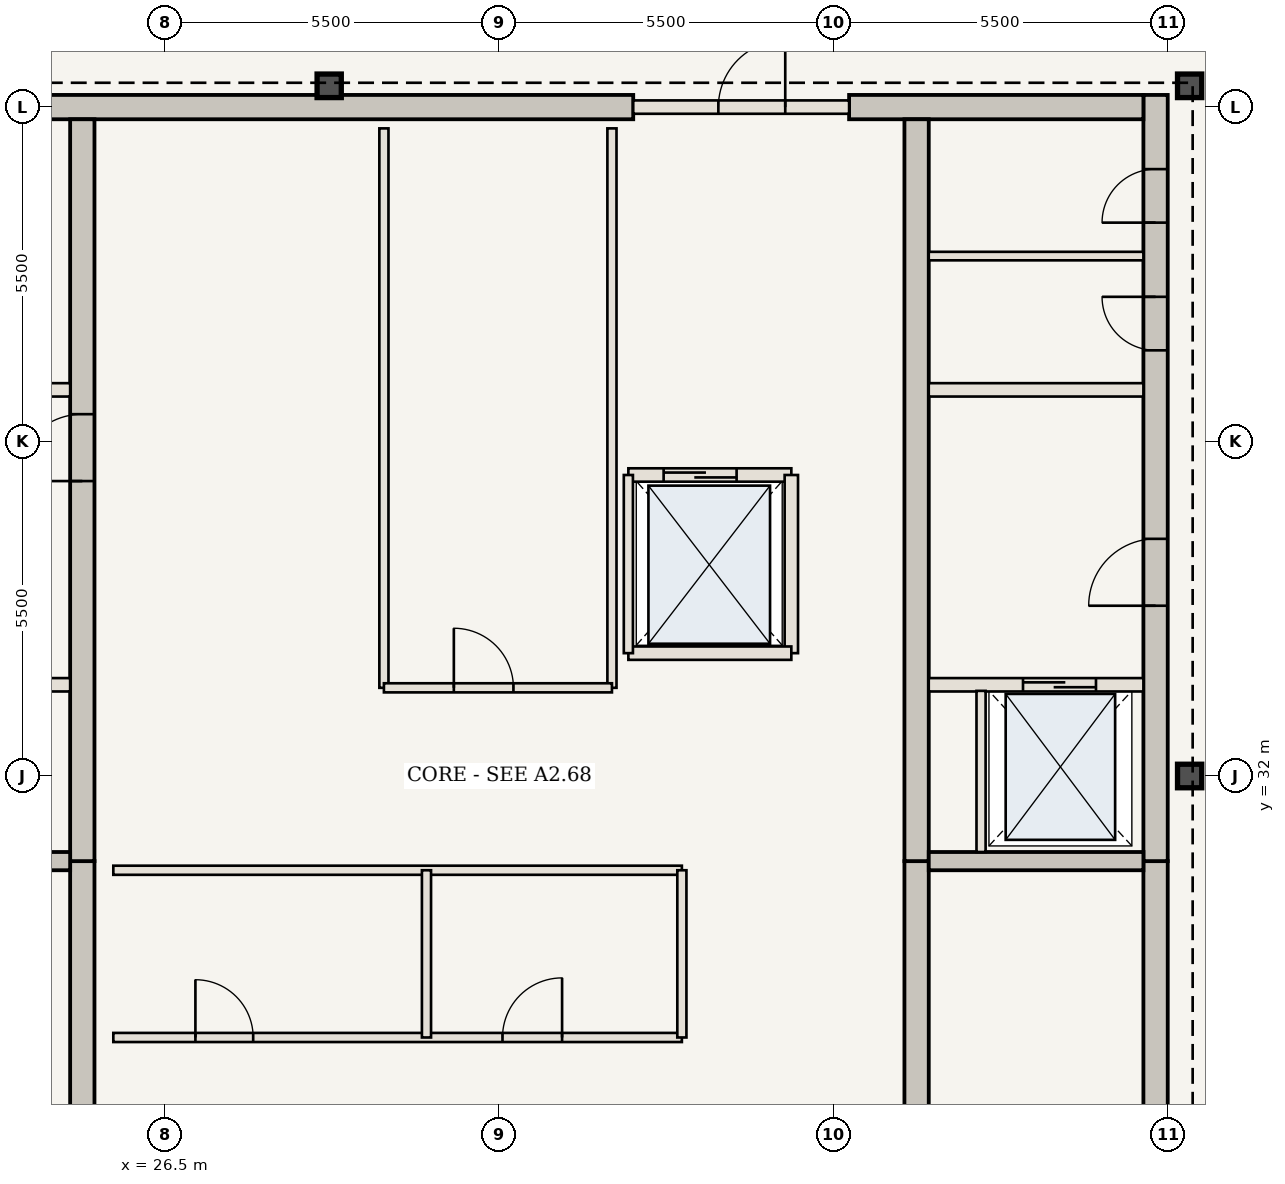
"""IFC4 building model, lengths in metres.
Left out: names, types, materials, properties, quantities, classifications, styles, units other than length and angle.
Written with IfcOpenShell. Run it as: python <this file> out.ifc"""

import sys

from ifc_helpers import new_model, si_unit, direction, frame, frame_2d, origin, origin_2d, place, context, subcontext, project, spatial, rectangle, i_section, extrude, element, fill, save


model = new_model("IFC4")
c1 = context("Model", 3, precision=1e-05, world=origin(), true_north=direction((0.0, 1.0)))
c2 = subcontext(c1, "Body", "Model", "MODEL_VIEW")
j1 = project(units=[si_unit("LENGTHUNIT", "METRE"), si_unit("PLANEANGLEUNIT", "RADIAN")], contexts=[c1])
p1 = place(None, origin())
s1 = spatial("IfcSite", under=j1, at=p1, CompositionType="ELEMENT")
p2 = place(p1, origin())
s2 = spatial("IfcBuilding", under=s1, at=p2, CompositionType="ELEMENT")
p3 = place(p2, frame((0.0, 0.0, 326.9)))
s3 = spatial("IfcBuildingStorey", under=s2, at=p3, CompositionType="ELEMENT", Elevation=326.9)
p4 = place(p3, frame((42.79, 20.75, 0.0), z_axis=(0.0, 0.0, 1.0), x_axis=(0.0, 1.0, 0.0)))
e1 = element("IfcWall", 1, at=p4, inside=s3, PredefinedType="SHEAR", context=c2, shape_type="SweptSolid", body=[
    extrude(rectangle(XDim=9.85, YDim=0.4, at=frame_2d((4.925, 0.0))), origin(), (0.0, 0.0, 1.0), 4.55),
])
p5 = place(p4, frame((1.0, 0.0, 0.0)))
e2 = element("IfcOpeningElement", 2, at=p5, cuts=e1, PredefinedType="OPENING", context=c2, shape_type="SweptSolid", body=[
    extrude(rectangle(XDim=1.15, YDim=2.15, at=frame_2d((0.575, 1.075))), frame((0.0, 0.21, 0.0), z_axis=(0.0, -1.0, 0.0), x_axis=(1.0, 0.0, 0.0)), (0.0, 0.0, 1.0), 0.42),
])
p6 = place(p3, frame((42.79, 30.6, 0.0), z_axis=(0.0, 0.0, 1.0), x_axis=(0.0, 1.0, 0.0)))
e3 = element("IfcWall", 3, at=p6, inside=s3, PredefinedType="SHEAR", context=c2, shape_type="SweptSolid", body=[
    extrude(rectangle(XDim=12.6, YDim=0.4, at=frame_2d((6.3, 0.0))), origin(), (0.0, 0.0, 1.0), 4.55),
])
p7 = place(p6, frame((4.2, 0.0, 0.0)))
e4 = element("IfcOpeningElement", 4, at=p7, cuts=e3, PredefinedType="OPENING", context=c2, shape_type="SweptSolid", body=[
    extrude(rectangle(XDim=1.1, YDim=2.15, at=frame_2d((0.55, 1.075))), frame((0.0, 0.21, 0.0), z_axis=(0.0, -1.0, 0.0), x_axis=(1.0, 0.0, 0.0)), (0.0, 0.0, 1.0), 0.42),
])
p8 = place(p6, frame((8.4, 0.0, 0.0)))
e5 = element("IfcOpeningElement", 5, at=p8, cuts=e3, PredefinedType="OPENING", context=c2, shape_type="SweptSolid", body=[
    extrude(rectangle(XDim=0.88, YDim=2.1, at=frame_2d((0.44, 1.05))), frame((0.0, 0.21, 0.0), z_axis=(0.0, -1.0, 0.0), x_axis=(1.0, 0.0, 0.0)), (0.0, 0.0, 1.0), 0.42),
])
p9 = place(p6, frame((10.5, 0.0, 0.0)))
e6 = element("IfcOpeningElement", 6, at=p9, cuts=e3, PredefinedType="OPENING", context=c2, shape_type="SweptSolid", body=[
    extrude(rectangle(XDim=0.88, YDim=2.1, at=frame_2d((0.44, 1.05))), frame((0.0, 0.21, 0.0), z_axis=(0.0, -1.0, 0.0), x_axis=(1.0, 0.0, 0.0)), (0.0, 0.0, 1.0), 0.42),
])
p10 = place(p3, frame((21.41, 43.0, 0.0), z_axis=(0.0, 0.0, 1.0), x_axis=(1.0, 0.0, 0.0)))
e7 = element("IfcWall", 7, at=p10, inside=s3, PredefinedType="SHEAR", context=c2, shape_type="SweptSolid", body=[
    extrude(rectangle(XDim=12.79, YDim=0.4, at=frame_2d((6.395, 0.0))), origin(), (0.0, 0.0, 1.0), 4.55),
])
p11 = place(p3, frame((37.75, 43.0, 0.0), z_axis=(0.0, 0.0, 1.0), x_axis=(1.0, 0.0, 0.0)))
e8 = element("IfcWall", 8, at=p11, inside=s3, PredefinedType="SHEAR", context=c2, shape_type="SweptSolid", body=[
    extrude(rectangle(XDim=4.84, YDim=0.4, at=frame_2d((2.42, 0.0))), origin(), (0.0, 0.0, 1.0), 4.55),
])
p12 = place(p3, frame((25.14, 21.15, 0.0), z_axis=(0.0, 0.0, 1.0), x_axis=(0.0, 1.0, 0.0)))
e9 = element("IfcWall", 9, at=p12, inside=s3, PredefinedType="SHEAR", context=c2, shape_type="SweptSolid", body=[
    extrude(rectangle(XDim=9.45, YDim=0.4, at=frame_2d((4.725, 0.0))), origin(), (0.0, 0.0, 1.0), 4.55),
])
p13 = place(p3, frame((25.14, 30.6, 0.0), z_axis=(0.0, 0.0, 1.0), x_axis=(0.0, 1.0, 0.0)))
e10 = element("IfcWall", 10, at=p13, inside=s3, PredefinedType="SHEAR", context=c2, shape_type="SweptSolid", body=[
    extrude(rectangle(XDim=12.2, YDim=0.4, at=frame_2d((6.1, 0.0))), origin(), (0.0, 0.0, 1.0), 4.55),
])
p14 = place(p13, frame((6.25, 0.0, 0.0)))
e11 = element("IfcOpeningElement", 11, at=p14, cuts=e10, PredefinedType="OPENING", context=c2, shape_type="SweptSolid", body=[
    extrude(rectangle(XDim=1.1, YDim=2.15, at=frame_2d((0.55, 1.075))), frame((0.0, 0.21, 0.0), z_axis=(0.0, -1.0, 0.0), x_axis=(1.0, 0.0, 0.0)), (0.0, 0.0, 1.0), 0.42),
])
p15 = place(p3, frame((38.86, 21.15, 0.0), z_axis=(0.0, 0.0, 1.0), x_axis=(0.0, 1.0, 0.0)))
e12 = element("IfcWall", 12, at=p15, inside=s3, PredefinedType="SHEAR", context=c2, shape_type="SweptSolid", body=[
    extrude(rectangle(XDim=9.45, YDim=0.4, at=frame_2d((4.725, 0.0))), origin(), (0.0, 0.0, 1.0), 4.55),
])
p16 = place(p3, frame((38.86, 30.6, 0.0), z_axis=(0.0, 0.0, 1.0), x_axis=(0.0, 1.0, 0.0)))
e13 = element("IfcWall", 13, at=p16, inside=s3, PredefinedType="SHEAR", context=c2, shape_type="SweptSolid", body=[
    extrude(rectangle(XDim=12.2, YDim=0.4, at=frame_2d((6.1, 0.0))), origin(), (0.0, 0.0, 1.0), 4.55),
])
for number, where, z_axis, x_axis in (
    (14, (43.35, 32.0, 0.0), (0.0, 0.0, 1.0), (1.0, 0.0, 0.0)),
    (15, (43.35, 43.35, 0.0), (0.0, 0.0, 1.0), (1.0, 0.0, 0.0)),
    (16, (29.2, 43.35, 0.0), (0.0, 0.0, 1.0), (1.0, 0.0, 0.0)),
):
    element("IfcColumn", number, at=place(p3, frame(where, z_axis=z_axis, x_axis=x_axis)), inside=s3, PredefinedType="COLUMN", context=c2, shape_type="SweptSolid", body=[
        extrude(i_section(OverallWidth=0.398, OverallDepth=0.387, WebThickness=0.021, FlangeThickness=0.033, at=origin_2d()), origin(), (0.0, 0.0, 1.0), 4.55),
    ])
for number, where, z_axis, x_axis in (
    (17, (21.41, 30.6, 0.0), (0.0, 0.0, 1.0), (1.0, 0.0, 0.0)),
    (18, (39.06, 30.6, 0.0), (0.0, 0.0, 1.0), (1.0, 0.0, 0.0)),
):
    element("IfcWall", number, at=place(p3, frame(where, z_axis=z_axis, x_axis=x_axis)), inside=s3, PredefinedType="SHEAR", context=c2, shape_type="SweptSolid", body=[
        extrude(rectangle(XDim=3.53, YDim=0.3, at=frame_2d((1.765, 0.0))), origin(), (0.0, 0.0, 1.0), 4.29),
    ])
p17 = place(p3, frame((21.41, 33.5, 0.0), z_axis=(0.0, 0.0, 1.0), x_axis=(1.0, 0.0, 0.0)))
e19 = element("IfcWall", 19, at=p17, inside=s3, PredefinedType="STANDARD", context=c2, shape_type="SweptSolid", body=[
    extrude(rectangle(XDim=3.53, YDim=0.22, at=frame_2d((1.765, 0.0))), origin(), (0.0, 0.0, 1.0), 4.29),
])
p18 = place(p17, frame((0.75, 0.0, 0.0)))
e20 = element("IfcOpeningElement", 20, at=p18, cuts=e19, PredefinedType="OPENING", context=c2, shape_type="SweptSolid", body=[
    extrude(rectangle(XDim=1.2, YDim=2.2, at=frame_2d((0.6, 1.1))), frame((0.0, 0.12, 0.0), z_axis=(0.0, -1.0, 0.0), x_axis=(1.0, 0.0, 0.0)), (0.0, 0.0, 1.0), 0.24),
])
p19 = place(p3, frame((39.06, 33.5, 0.0), z_axis=(0.0, 0.0, 1.0), x_axis=(1.0, 0.0, 0.0)))
e21 = element("IfcWall", 21, at=p19, inside=s3, PredefinedType="STANDARD", context=c2, shape_type="SweptSolid", body=[
    extrude(rectangle(XDim=3.53, YDim=0.22, at=frame_2d((1.765, 0.0))), origin(), (0.0, 0.0, 1.0), 4.29),
])
p20 = place(p19, frame((1.55, 0.0, 0.0)))
e22 = element("IfcOpeningElement", 22, at=p20, cuts=e21, PredefinedType="OPENING", context=c2, shape_type="SweptSolid", body=[
    extrude(rectangle(XDim=1.2, YDim=2.2, at=frame_2d((0.6, 1.1))), frame((0.0, 0.12, 0.0), z_axis=(0.0, -1.0, 0.0), x_axis=(1.0, 0.0, 0.0)), (0.0, 0.0, 1.0), 0.24),
])
p21 = place(p3, frame((39.92, 30.75, 0.0), z_axis=(0.0, 0.0, 1.0), x_axis=(0.0, 1.0, 0.0)))
e23 = element("IfcWall", 23, at=p21, inside=s3, PredefinedType="STANDARD", context=c2, shape_type="SweptSolid", body=[
    extrude(rectangle(XDim=2.65, YDim=0.15, at=frame_2d((1.325, 0.0))), origin(), (0.0, 0.0, 1.0), 4.29),
])
for number, where, z_axis, x_axis in (
    (24, (21.41, 38.35, 0.0), (0.0, 0.0, 1.0), (1.0, 0.0, 0.0)),
    (25, (39.06, 38.35, 0.0), (0.0, 0.0, 1.0), (1.0, 0.0, 0.0)),
):
    element("IfcWall", number, at=place(p3, frame(where, z_axis=z_axis, x_axis=x_axis)), inside=s3, PredefinedType="STANDARD", context=c2, shape_type="SweptSolid", body=[
        extrude(rectangle(XDim=3.53, YDim=0.22, at=frame_2d((1.765, 0.0))), origin(), (0.0, 0.0, 1.0), 4.29),
    ])
p22 = place(p3, frame((39.06, 40.55, 0.0), z_axis=(0.0, 0.0, 1.0), x_axis=(1.0, 0.0, 0.0)))
e26 = element("IfcWall", 26, at=p22, inside=s3, PredefinedType="STANDARD", context=c2, shape_type="SweptSolid", body=[
    extrude(rectangle(XDim=3.53, YDim=0.14, at=frame_2d((1.765, 0.0))), origin(), (0.0, 0.0, 1.0), 4.29),
])
p23 = place(p3, frame((25.65, 27.7, 0.0), z_axis=(0.0, 0.0, 1.0), x_axis=(1.0, 0.0, 0.0)))
e27 = element("IfcWall", 27, at=p23, inside=s3, PredefinedType="STANDARD", context=c2, shape_type="SweptSolid", body=[
    extrude(rectangle(XDim=9.35, YDim=0.15, at=frame_2d((4.675, 0.0))), origin(), (0.0, 0.0, 1.0), 4.29),
])
p24 = place(p23, frame((1.35, 0.0, 0.0)))
e28 = element("IfcOpeningElement", 28, at=p24, cuts=e27, PredefinedType="OPENING", context=c2, shape_type="SweptSolid", body=[
    extrude(rectangle(XDim=0.95, YDim=2.15, at=frame_2d((0.475, 1.075))), frame((0.0, 0.085, 0.0), z_axis=(0.0, -1.0, 0.0), x_axis=(1.0, 0.0, 0.0)), (0.0, 0.0, 1.0), 0.17),
])
p25 = place(p23, frame((6.4, 0.0, 0.0)))
e29 = element("IfcOpeningElement", 29, at=p25, cuts=e27, PredefinedType="OPENING", context=c2, shape_type="SweptSolid", body=[
    extrude(rectangle(XDim=0.98, YDim=2.2, at=frame_2d((0.49, 1.1))), frame((0.0, 0.085, 0.0), z_axis=(0.0, -1.0, 0.0), x_axis=(1.0, 0.0, 0.0)), (0.0, 0.0, 1.0), 0.17),
])
p26 = place(p3, frame((25.65, 30.45, 0.0), z_axis=(0.0, 0.0, 1.0), x_axis=(1.0, 0.0, 0.0)))
e30 = element("IfcWall", 30, at=p26, inside=s3, PredefinedType="STANDARD", context=c2, shape_type="SweptSolid", body=[
    extrude(rectangle(XDim=9.35, YDim=0.15, at=frame_2d((4.675, 0.0))), origin(), (0.0, 0.0, 1.0), 4.29),
])
for number, where, z_axis, x_axis in (
    (31, (30.8, 27.7, 0.0), (0.0, 0.0, 1.0), (0.0, 1.0, 0.0)),
    (32, (35.0, 27.7, 0.0), (0.0, 0.0, 1.0), (0.0, 1.0, 0.0)),
):
    element("IfcWall", number, at=place(p3, frame(where, z_axis=z_axis, x_axis=x_axis)), inside=s3, PredefinedType="STANDARD", context=c2, shape_type="SweptSolid", body=[
        extrude(rectangle(XDim=2.75, YDim=0.15, at=frame_2d((1.375, 0.0))), origin(), (0.0, 0.0, 1.0), 4.29),
    ])
for number, where, z_axis, x_axis in (
    (33, (30.1, 33.45, 0.0), (0.0, 0.0, 1.0), (0.0, 1.0, 0.0)),
    (34, (33.85, 33.45, 0.0), (0.0, 0.0, 1.0), (0.0, 1.0, 0.0)),
):
    element("IfcWall", number, at=place(p3, frame(where, z_axis=z_axis, x_axis=x_axis)), inside=s3, PredefinedType="STANDARD", context=c2, shape_type="SweptSolid", body=[
        extrude(rectangle(XDim=9.2, YDim=0.15, at=frame_2d((4.6, 0.0))), origin(), (0.0, 0.0, 1.0), 4.29),
    ])
p27 = place(p3, frame((30.1, 33.45, 0.0), z_axis=(0.0, 0.0, 1.0), x_axis=(1.0, 0.0, 0.0)))
e35 = element("IfcWall", 35, at=p27, inside=s3, PredefinedType="STANDARD", context=c2, shape_type="SweptSolid", body=[
    extrude(rectangle(XDim=3.75, YDim=0.15, at=frame_2d((1.875, 0.0))), origin(), (0.0, 0.0, 1.0), 4.29),
])
p28 = place(p27, frame((1.15, 0.0, 0.0)))
e36 = element("IfcOpeningElement", 36, at=p28, cuts=e35, PredefinedType="OPENING", context=c2, shape_type="SweptSolid", body=[
    extrude(rectangle(XDim=0.98, YDim=2.2, at=frame_2d((0.49, 1.1))), frame((0.0, 0.085, 0.0), z_axis=(0.0, -1.0, 0.0), x_axis=(1.0, 0.0, 0.0)), (0.0, 0.0, 1.0), 0.17),
])
p29 = place(p3, frame((34.2, 43.0, 0.0), z_axis=(0.0, 0.0, 1.0), x_axis=(1.0, 0.0, 0.0)))
e37 = element("IfcWall", 37, at=p29, inside=s3, PredefinedType="STANDARD", context=c2, shape_type="SweptSolid", body=[
    extrude(rectangle(XDim=3.55, YDim=0.22, at=frame_2d((1.775, 0.0))), origin(), (0.0, 0.0, 1.0), 4.29),
])
p30 = place(p29, frame((1.4, 0.0, 0.0)))
e38 = element("IfcOpeningElement", 38, at=p30, cuts=e37, PredefinedType="OPENING", context=c2, shape_type="SweptSolid", body=[
    extrude(rectangle(XDim=1.1, YDim=2.15, at=frame_2d((0.55, 1.075))), frame((0.0, 0.12, 0.0), z_axis=(0.0, -1.0, 0.0), x_axis=(1.0, 0.0, 0.0)), (0.0, 0.0, 1.0), 0.24),
])
p31 = place(p3, frame((34.12, 36.95, 0.0), z_axis=(0.0, 0.0, 1.0), x_axis=(1.0, 0.0, 0.0)))
e39 = element("IfcWall", 39, at=p31, inside=s3, PredefinedType="STANDARD", context=c2, shape_type="SweptSolid", body=[
    extrude(rectangle(XDim=2.68, YDim=0.22, at=frame_2d((1.34, 0.0))), origin(), (0.0, 0.0, 1.0), 4.29),
])
p32 = place(p31, frame((0.58, 0.0, 0.0)))
e40 = element("IfcOpeningElement", 40, at=p32, cuts=e39, PredefinedType="OPENING", context=c2, shape_type="SweptSolid", body=[
    extrude(rectangle(XDim=1.2, YDim=2.2, at=frame_2d((0.6, 1.1))), frame((0.0, 0.12, 0.0), z_axis=(0.0, -1.0, 0.0), x_axis=(1.0, 0.0, 0.0)), (0.0, 0.0, 1.0), 0.24),
])
p33 = place(p3, frame((36.8, 34.02, 0.0), z_axis=(0.0, 0.0, 1.0), x_axis=(0.0, 1.0, 0.0)))
e41 = element("IfcWall", 41, at=p33, inside=s3, PredefinedType="STANDARD", context=c2, shape_type="SweptSolid", body=[
    extrude(rectangle(XDim=2.93, YDim=0.22, at=frame_2d((1.465, 0.0))), origin(), (0.0, 0.0, 1.0), 4.29),
])
p34 = place(p3, frame((34.12, 34.02, 0.0), z_axis=(0.0, 0.0, 1.0), x_axis=(1.0, 0.0, 0.0)))
e42 = element("IfcWall", 42, at=p34, inside=s3, PredefinedType="STANDARD", context=c2, shape_type="SweptSolid", body=[
    extrude(rectangle(XDim=2.68, YDim=0.22, at=frame_2d((1.34, 0.0))), origin(), (0.0, 0.0, 1.0), 4.29),
])
p35 = place(p3, frame((34.12, 34.02, 0.0), z_axis=(0.0, 0.0, 1.0), x_axis=(0.0, 1.0, 0.0)))
e43 = element("IfcWall", 43, at=p35, inside=s3, PredefinedType="STANDARD", context=c2, shape_type="SweptSolid", body=[
    extrude(rectangle(XDim=2.93, YDim=0.15, at=frame_2d((1.465, 0.0))), origin(), (0.0, 0.0, 1.0), 4.29),
])
p36 = place(p7, origin())
e44 = element("IfcDoor", 44, at=p36, inside=s3, OperationType="SINGLE_SWING_LEFT", PredefinedType="DOOR", context=c2, shape_type="SweptSolid", body=[
    extrude(rectangle(XDim=1.1, YDim=2.15, at=frame_2d((0.55, 1.075))), frame((0.0, 0.025, 0.0), z_axis=(0.0, -1.0, 0.0), x_axis=(1.0, 0.0, 0.0)), (0.0, 0.0, 1.0), 0.05),
])
fill(e4, e44)
p37 = place(p14, origin())
e45 = element("IfcDoor", 45, at=p37, inside=s3, OperationType="SINGLE_SWING_LEFT", PredefinedType="DOOR", context=c2, shape_type="SweptSolid", body=[
    extrude(rectangle(XDim=1.1, YDim=2.15, at=frame_2d((0.55, 1.075))), frame((0.0, 0.025, 0.0), z_axis=(0.0, -1.0, 0.0), x_axis=(1.0, 0.0, 0.0)), (0.0, 0.0, 1.0), 0.05),
])
fill(e11, e45)
p38 = place(p8, origin())
e46 = element("IfcDoor", 46, at=p38, inside=s3, OperationType="SINGLE_SWING_RIGHT", PredefinedType="DOOR", context=c2, shape_type="SweptSolid", body=[
    extrude(rectangle(XDim=0.88, YDim=2.1, at=frame_2d((0.44, 1.05))), frame((0.0, 0.025, 0.0), z_axis=(0.0, -1.0, 0.0), x_axis=(1.0, 0.0, 0.0)), (0.0, 0.0, 1.0), 0.05),
])
fill(e5, e46)
p39 = place(p9, origin())
e47 = element("IfcDoor", 47, at=p39, inside=s3, OperationType="SINGLE_SWING_LEFT", PredefinedType="DOOR", context=c2, shape_type="SweptSolid", body=[
    extrude(rectangle(XDim=0.88, YDim=2.1, at=frame_2d((0.44, 1.05))), frame((0.0, 0.025, 0.0), z_axis=(0.0, -1.0, 0.0), x_axis=(1.0, 0.0, 0.0)), (0.0, 0.0, 1.0), 0.05),
])
fill(e6, e47)
p40 = place(p20, origin())
e48 = element("IfcDoor", 48, at=p40, inside=s3, OperationType="DOUBLE_DOOR_SLIDING", PredefinedType="DOOR", context=c2, shape_type="SweptSolid", body=[
    extrude(rectangle(XDim=1.2, YDim=2.2, at=frame_2d((0.6, 1.1))), frame((0.0, 0.025, 0.0), z_axis=(0.0, -1.0, 0.0), x_axis=(1.0, 0.0, 0.0)), (0.0, 0.0, 1.0), 0.05),
])
fill(e22, e48)
p41 = place(p24, origin())
e49 = element("IfcDoor", 49, at=p41, inside=s3, OperationType="SINGLE_SWING_LEFT", PredefinedType="DOOR", context=c2, shape_type="SweptSolid", body=[
    extrude(rectangle(XDim=0.95, YDim=2.15, at=frame_2d((0.475, 1.075))), frame((0.0, 0.025, 0.0), z_axis=(0.0, -1.0, 0.0), x_axis=(1.0, 0.0, 0.0)), (0.0, 0.0, 1.0), 0.05),
])
fill(e28, e49)
p42 = place(p25, origin())
e50 = element("IfcDoor", 50, at=p42, inside=s3, OperationType="SINGLE_SWING_RIGHT", PredefinedType="DOOR", context=c2, shape_type="SweptSolid", body=[
    extrude(rectangle(XDim=0.98, YDim=2.2, at=frame_2d((0.49, 1.1))), frame((0.0, 0.025, 0.0), z_axis=(0.0, -1.0, 0.0), x_axis=(1.0, 0.0, 0.0)), (0.0, 0.0, 1.0), 0.05),
])
fill(e29, e50)
p43 = place(p28, origin())
e51 = element("IfcDoor", 51, at=p43, inside=s3, OperationType="SINGLE_SWING_LEFT", PredefinedType="DOOR", context=c2, shape_type="SweptSolid", body=[
    extrude(rectangle(XDim=0.98, YDim=2.2, at=frame_2d((0.49, 1.1))), frame((0.0, 0.025, 0.0), z_axis=(0.0, -1.0, 0.0), x_axis=(1.0, 0.0, 0.0)), (0.0, 0.0, 1.0), 0.05),
])
fill(e36, e51)
p44 = place(p30, origin())
e52 = element("IfcDoor", 52, at=p44, inside=s3, OperationType="SINGLE_SWING_RIGHT", PredefinedType="DOOR", context=c2, shape_type="SweptSolid", body=[
    extrude(rectangle(XDim=1.1, YDim=2.15, at=frame_2d((0.55, 1.075))), frame((0.0, 0.025, 0.0), z_axis=(0.0, -1.0, 0.0), x_axis=(1.0, 0.0, 0.0)), (0.0, 0.0, 1.0), 0.05),
])
fill(e38, e52)
p45 = place(p32, origin())
e53 = element("IfcDoor", 53, at=p45, inside=s3, OperationType="DOUBLE_DOOR_SLIDING", PredefinedType="DOOR", context=c2, shape_type="SweptSolid", body=[
    extrude(rectangle(XDim=1.2, YDim=2.2, at=frame_2d((0.6, 1.1))), frame((0.0, 0.025, 0.0), z_axis=(0.0, -1.0, 0.0), x_axis=(1.0, 0.0, 0.0)), (0.0, 0.0, 1.0), 0.05),
])
fill(e40, e53)
save(model, sys.argv[1])
